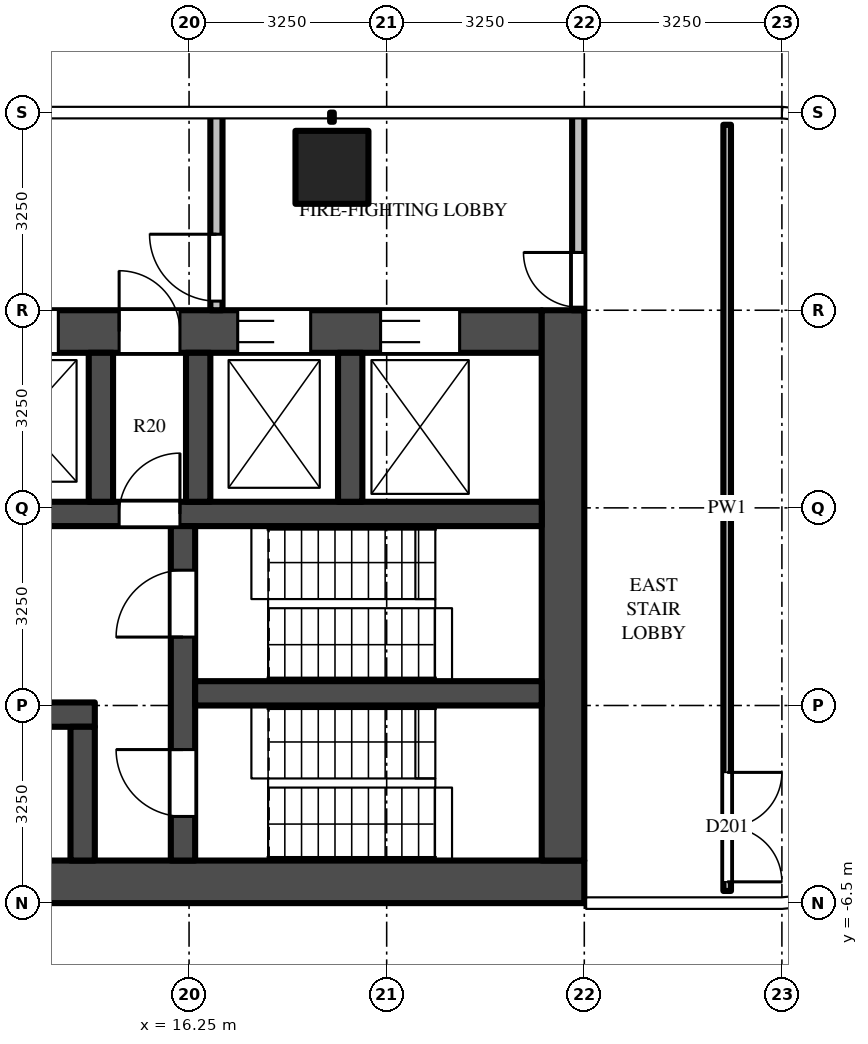
"""IFC4 building model, lengths in metres.
Left out: names, types, materials, properties, quantities, classifications, styles, units other than length and angle.
Written with IfcOpenShell. Run it as: python <this file> out.ifc"""

import sys

from ifc_helpers import new_model, si_unit, direction, frame, frame_2d, origin, origin_2d, place, context, subcontext, project, spatial, rectangle, extrude, source, transform, mapped, element, fill, save


model = new_model("IFC4")
c1 = context("Model", 3, precision=1e-05, world=origin(), true_north=direction((0.0, 1.0)))
c2 = subcontext(c1, "Body", "Model", "MODEL_VIEW")
j1 = project(units=[si_unit("LENGTHUNIT", "METRE"), si_unit("PLANEANGLEUNIT", "RADIAN")], contexts=[c1])
p1 = place(None, origin())
s1 = spatial("IfcSite", under=j1, at=p1, CompositionType="ELEMENT")
p2 = place(p1, origin())
s2 = spatial("IfcBuilding", under=s1, at=p2, CompositionType="ELEMENT")
p3 = place(p2, frame((0.0, 0.0, 208.8)))
s3 = spatial("IfcBuildingStorey", under=s2, at=p3, CompositionType="ELEMENT", Elevation=208.8)
m1 = source(origin(), c2, "Body", "SweptSolid", [
    extrude(rectangle(XDim=1.2, YDim=1.2, at=origin_2d()), origin(), (0.0, 0.0, 1.0), 3.9),
])
p4 = place(p3, frame((18.6, 5.6, 0.0), z_axis=(0.0, 0.0, 1.0), x_axis=(1.0, 0.0, 0.0)))
e1 = element("IfcColumn", 1, at=p4, inside=s3, PredefinedType="COLUMN", context=c2, shape_type="MappedRepresentation", body=[
    mapped(m1, transform((0.0, 0.0, 0.0))),
])
m2 = source(origin(), c2, "Body", "SweptSolid", [
    extrude(rectangle(XDim=16.55, YDim=0.7, at=frame_2d((8.275, 0.0))), origin(), (0.0, 0.0, 1.0), 3.45),
])
p5 = place(p3, frame((6.2, -6.15, 0.0), z_axis=(0.0, 0.0, 1.0), x_axis=(1.0, 0.0, 0.0)))
e2 = element("IfcWall", 2, at=p5, inside=s3, PredefinedType="SHEAR", context=c2, shape_type="MappedRepresentation", body=[
    mapped(m2, transform((0.0, 0.0, 0.0))),
])
m3 = source(origin(), c2, "Body", "SweptSolid", [
    extrude(rectangle(XDim=14.85, YDim=0.7, at=frame_2d((7.425, 0.0))), origin(), (0.0, 0.0, 1.0), 3.45),
])
p6 = place(p3, frame((7.2, 2.9, 0.0), z_axis=(0.0, 0.0, 1.0), x_axis=(1.0, 0.0, 0.0)))
e3 = element("IfcWall", 3, at=p6, inside=s3, PredefinedType="SHEAR", context=c2, shape_type="MappedRepresentation", body=[
    mapped(m3, transform((0.0, 0.0, 0.0))),
])
m4 = source(origin(), c2, "Body", "SweptSolid", [
    extrude(rectangle(XDim=1.1, YDim=2.1, at=frame_2d((0.55, 1.05))), frame((0.0, 0.36, 0.0), z_axis=(0.0, -1.0, 0.0), x_axis=(1.0, 0.0, 0.0)), (0.0, 0.0, 1.0), 0.72),
])
p7 = place(p6, frame((0.55, 0.0, 0.0)))
e4 = element("IfcOpeningElement", 4, at=p7, cuts=e3, PredefinedType="OPENING", context=c2, shape_type="MappedRepresentation", body=[
    mapped(m4, transform((0.0, 0.0, 0.0))),
])
p8 = place(p6, frame((3.15, 0.0, 0.0)))
e5 = element("IfcOpeningElement", 5, at=p8, cuts=e3, PredefinedType="OPENING", context=c2, shape_type="MappedRepresentation", body=[
    mapped(m4, transform((0.0, 0.0, 0.0))),
])
m5 = source(origin(), c2, "Body", "SweptSolid", [
    extrude(rectangle(XDim=1.2, YDim=2.1, at=frame_2d((0.6, 1.05))), frame((0.0, 0.36, 0.0), z_axis=(0.0, -1.0, 0.0), x_axis=(1.0, 0.0, 0.0)), (0.0, 0.0, 1.0), 0.72),
])
p9 = place(p6, frame((5.7, 0.0, 0.0)))
e6 = element("IfcOpeningElement", 6, at=p9, cuts=e3, PredefinedType="OPENING", context=c2, shape_type="MappedRepresentation", body=[
    mapped(m5, transform((0.0, 0.0, 0.0))),
])
m6 = source(origin(), c2, "Body", "SweptSolid", [
    extrude(rectangle(XDim=1.3, YDim=2.1, at=frame_2d((0.65, 1.05))), frame((0.0, 0.36, 0.0), z_axis=(0.0, -1.0, 0.0), x_axis=(1.0, 0.0, 0.0)), (0.0, 0.0, 1.0), 0.72),
])
p10 = place(p6, frame((12.2, 0.0, 0.0)))
e7 = element("IfcOpeningElement", 7, at=p10, cuts=e3, PredefinedType="OPENING", context=c2, shape_type="MappedRepresentation", body=[
    mapped(m6, transform((0.0, 0.0, 0.0))),
])
p11 = place(p6, frame((9.85, 0.0, 0.0)))
e8 = element("IfcOpeningElement", 8, at=p11, cuts=e3, PredefinedType="OPENING", context=c2, shape_type="MappedRepresentation", body=[
    mapped(m5, transform((0.0, 0.0, 0.0))),
])
m7 = source(origin(), c2, "Body", "SweptSolid", [
    extrude(rectangle(XDim=1.0, YDim=2.1, at=frame_2d((0.5, 1.05))), frame((0.0, 0.36, 0.0), z_axis=(0.0, -1.0, 0.0), x_axis=(1.0, 0.0, 0.0)), (0.0, 0.0, 1.0), 0.72),
])
p12 = place(p6, frame((7.9, 0.0, 0.0)))
e9 = element("IfcOpeningElement", 9, at=p12, cuts=e3, PredefinedType="OPENING", context=c2, shape_type="MappedRepresentation", body=[
    mapped(m7, transform((0.0, 0.0, 0.0))),
])
m8 = source(origin(), c2, "Body", "SweptSolid", [
    extrude(rectangle(XDim=9.05, YDim=0.7, at=frame_2d((4.525, 0.0))), origin(), (0.0, 0.0, 1.0), 3.45),
])
p13 = place(p3, frame((22.4, -5.8, 0.0), z_axis=(0.0, 0.0, 1.0), x_axis=(0.0, 1.0, 0.0)))
e10 = element("IfcWall", 10, at=p13, inside=s3, PredefinedType="SHEAR", context=c2, shape_type="MappedRepresentation", body=[
    mapped(m8, transform((0.0, 0.0, 0.0))),
])
m9 = source(origin(), c2, "Body", "SweptSolid", [
    extrude(rectangle(XDim=7.5, YDim=0.4, at=frame_2d((3.75, 0.0))), origin(), (0.0, 0.0, 1.0), 3.45),
])
p14 = place(p3, frame((7.2, -3.4, 0.0), z_axis=(0.0, 0.0, 1.0), x_axis=(1.0, 0.0, 0.0)))
e11 = element("IfcWall", 11, at=p14, inside=s3, PredefinedType="SHEAR", context=c2, shape_type="MappedRepresentation", body=[
    mapped(m9, transform((0.0, 0.0, 0.0))),
])
m10 = source(origin(), c2, "Body", "SweptSolid", [
    extrude(rectangle(XDim=1.0, YDim=2.1, at=frame_2d((0.5, 1.05))), frame((0.0, 0.21, 0.0), z_axis=(0.0, -1.0, 0.0), x_axis=(1.0, 0.0, 0.0)), (0.0, 0.0, 1.0), 0.42),
])
p15 = place(p14, frame((1.238, 0.0, 0.0)))
e12 = element("IfcOpeningElement", 12, at=p15, cuts=e11, PredefinedType="OPENING", context=c2, shape_type="MappedRepresentation", body=[
    mapped(m10, transform((0.0, 0.0, 0.0))),
])
m11 = source(origin(), c2, "Body", "SweptSolid", [
    extrude(rectangle(XDim=0.9, YDim=2.1, at=frame_2d((0.45, 1.05))), frame((0.0, 0.21, 0.0), z_axis=(0.0, -1.0, 0.0), x_axis=(1.0, 0.0, 0.0)), (0.0, 0.0, 1.0), 0.42),
])
p16 = place(p14, frame((4.913, 0.0, 0.0)))
e13 = element("IfcOpeningElement", 13, at=p16, cuts=e11, PredefinedType="OPENING", context=c2, shape_type="MappedRepresentation", body=[
    mapped(m11, transform((0.0, 0.0, 0.0))),
])
m12 = source(origin(), c2, "Body", "SweptSolid", [
    extrude(rectangle(XDim=14.85, YDim=0.4, at=frame_2d((7.425, 0.0))), origin(), (0.0, 0.0, 1.0), 3.45),
])
p17 = place(p3, frame((7.2, -0.1, 0.0), z_axis=(0.0, 0.0, 1.0), x_axis=(1.0, 0.0, 0.0)))
e14 = element("IfcWall", 14, at=p17, inside=s3, PredefinedType="SHEAR", context=c2, shape_type="MappedRepresentation", body=[
    mapped(m12, transform((0.0, 0.0, 0.0))),
])
p18 = place(p17, frame((7.9, 0.0, 0.0)))
e15 = element("IfcOpeningElement", 15, at=p18, cuts=e14, PredefinedType="OPENING", context=c2, shape_type="MappedRepresentation", body=[
    mapped(m10, transform((0.0, 0.0, 0.0))),
])
m13 = source(origin(), c2, "Body", "SweptSolid", [
    extrude(rectangle(XDim=5.5, YDim=0.4, at=frame_2d((2.75, 0.0))), origin(), (0.0, 0.0, 1.0), 3.45),
])
p19 = place(p3, frame((16.15, -5.8, 0.0), z_axis=(0.0, 0.0, 1.0), x_axis=(0.0, 1.0, 0.0)))
e16 = element("IfcWall", 16, at=p19, inside=s3, PredefinedType="SHEAR", context=c2, shape_type="MappedRepresentation", body=[
    mapped(m13, transform((0.0, 0.0, 0.0))),
])
m14 = source(origin(), c2, "Body", "SweptSolid", [
    extrude(rectangle(XDim=1.1, YDim=2.1, at=frame_2d((0.55, 1.05))), frame((0.0, 0.21, 0.0), z_axis=(0.0, -1.0, 0.0), x_axis=(1.0, 0.0, 0.0)), (0.0, 0.0, 1.0), 0.42),
])
p20 = place(p19, frame((0.725, 0.0, 0.0)))
e17 = element("IfcOpeningElement", 17, at=p20, cuts=e16, PredefinedType="OPENING", context=c2, shape_type="MappedRepresentation", body=[
    mapped(m14, transform((0.0, 0.0, 0.0))),
])
p21 = place(p19, frame((3.675, 0.0, 0.0)))
e18 = element("IfcOpeningElement", 18, at=p21, cuts=e16, PredefinedType="OPENING", context=c2, shape_type="MappedRepresentation", body=[
    mapped(m14, transform((0.0, 0.0, 0.0))),
])
m15 = source(origin(), c2, "Body", "SweptSolid", [
    extrude(rectangle(XDim=5.7, YDim=0.4, at=frame_2d((2.85, 0.0))), origin(), (0.0, 0.0, 1.0), 3.45),
])
p22 = place(p3, frame((16.35, -3.05, 0.0), z_axis=(0.0, 0.0, 1.0), x_axis=(1.0, 0.0, 0.0)))
e19 = element("IfcWall", 19, at=p22, inside=s3, PredefinedType="SHEAR", context=c2, shape_type="MappedRepresentation", body=[
    mapped(m15, transform((0.0, 0.0, 0.0))),
])
m16 = source(origin(), c2, "Body", "SweptSolid", [
    extrude(rectangle(XDim=2.2, YDim=0.4, at=frame_2d((1.1, 0.0))), origin(), (0.0, 0.0, 1.0), 3.45),
])
p23 = place(p3, frame((14.5, -5.8, 0.0), z_axis=(0.0, 0.0, 1.0), x_axis=(0.0, 1.0, 0.0)))
e20 = element("IfcWall", 20, at=p23, inside=s3, PredefinedType="SHEAR", context=c2, shape_type="MappedRepresentation", body=[
    mapped(m16, transform((0.0, 0.0, 0.0))),
])
m17 = source(origin(), c2, "Body", "SweptSolid", [
    extrude(rectangle(XDim=2.45, YDim=0.4, at=frame_2d((1.225, 0.0))), origin(), (0.0, 0.0, 1.0), 3.45),
])
for number, where, z_axis, x_axis in (
    (21, (14.8, 0.1, 0.0), (0.0, 0.0, 1.0), (0.0, 1.0, 0.0)),
    (22, (16.4, 0.1, 0.0), (0.0, 0.0, 1.0), (0.0, 1.0, 0.0)),
    (23, (18.9, 0.1, 0.0), (0.0, 0.0, 1.0), (0.0, 1.0, 0.0)),
):
    element("IfcWall", number, at=place(p3, frame(where, z_axis=z_axis, x_axis=x_axis)), inside=s3, PredefinedType="SHEAR", context=c2, shape_type="MappedRepresentation", body=[
        mapped(m17, transform((0.0, 0.0, 0.0))),
    ])
m18 = source(origin(), c2, "Body", "SweptSolid", [
    extrude(rectangle(XDim=3.25, YDim=0.2, at=frame_2d((1.625, 0.0))), origin(), (0.0, 0.0, 1.0), 3.45),
])
p24 = place(p3, frame((16.7, 3.25, 0.0), z_axis=(0.0, 0.0, 1.0), x_axis=(0.0, 1.0, 0.0)))
e24 = element("IfcWall", 24, at=p24, inside=s3, PredefinedType="PARTITIONING", context=c2, shape_type="MappedRepresentation", body=[
    mapped(m18, transform((0.0, 0.0, 0.0))),
])
m19 = source(origin(), c2, "Body", "SweptSolid", [
    extrude(rectangle(XDim=1.1, YDim=2.1, at=frame_2d((0.55, 1.05))), frame((0.0, 0.11, 0.0), z_axis=(0.0, -1.0, 0.0), x_axis=(1.0, 0.0, 0.0)), (0.0, 0.0, 1.0), 0.22),
])
p25 = place(p24, frame((0.15, 0.0, 0.0)))
e25 = element("IfcOpeningElement", 25, at=p25, cuts=e24, PredefinedType="OPENING", context=c2, shape_type="MappedRepresentation", body=[
    mapped(m19, transform((0.0, 0.0, 0.0))),
])
p26 = place(p3, frame((22.65, 3.25, 0.0), z_axis=(0.0, 0.0, 1.0), x_axis=(0.0, 1.0, 0.0)))
e26 = element("IfcWall", 26, at=p26, inside=s3, PredefinedType="PARTITIONING", context=c2, shape_type="MappedRepresentation", body=[
    mapped(m18, transform((0.0, 0.0, 0.0))),
])
m20 = source(origin(), c2, "Body", "SweptSolid", [
    extrude(rectangle(XDim=0.9, YDim=2.1, at=frame_2d((0.45, 1.05))), frame((0.0, 0.11, 0.0), z_axis=(0.0, -1.0, 0.0), x_axis=(1.0, 0.0, 0.0)), (0.0, 0.0, 1.0), 0.22),
])
p27 = place(p26, frame((0.05, 0.0, 0.0)))
e27 = element("IfcOpeningElement", 27, at=p27, cuts=e26, PredefinedType="OPENING", context=c2, shape_type="MappedRepresentation", body=[
    mapped(m20, transform((0.0, 0.0, 0.0))),
])
m21 = source(origin(), c2, "Body", "SweptSolid", [
    extrude(rectangle(XDim=12.6, YDim=0.125, at=frame_2d((6.3, 0.0))), origin(), (0.0, 0.0, 1.0), 2.53),
])
p28 = place(p3, frame((25.1, 6.3, 0.0), z_axis=(0.0, 0.0, 1.0), x_axis=(0.0, -1.0, 0.0)))
e28 = element("IfcWall", 28, at=p28, inside=s3, PredefinedType="PARTITIONING", context=c2, shape_type="MappedRepresentation", body=[
    mapped(m21, transform((0.0, 0.0, 0.0))),
])
m22 = source(origin(), c2, "Body", "SweptSolid", [
    extrude(rectangle(XDim=1.8, YDim=2.1, at=frame_2d((0.9, 1.05))), frame((0.0, 0.073, 0.0), z_axis=(0.0, -1.0, 0.0), x_axis=(1.0, 0.0, 0.0)), (0.0, 0.0, 1.0), 0.145),
])
p29 = place(p28, frame((10.65, 0.0, 0.0)))
e29 = element("IfcOpeningElement", 29, at=p29, cuts=e28, PredefinedType="OPENING", context=c2, shape_type="MappedRepresentation", body=[
    mapped(m22, transform((0.0, 0.0, 0.0))),
])
m23 = source(origin(), c2, "Body", "SweptSolid", [
    extrude(rectangle(XDim=1.2, YDim=2.1, at=frame_2d((0.6, 1.05))), frame((0.0, -0.275, 0.0), z_axis=(0.0, -1.0, 0.0), x_axis=(1.0, 0.0, 0.0)), (0.0, 0.0, 1.0), 0.05),
])
p30 = place(p9, origin())
e30 = element("IfcDoor", 30, at=p30, inside=s3, OperationType="DOUBLE_DOOR_SLIDING", PredefinedType="DOOR", context=c2, shape_type="MappedRepresentation", body=[
    mapped(m23, transform((0.0, 0.0, 0.0))),
])
fill(e6, e30)
m24 = source(origin(), c2, "Body", "SweptSolid", [
    extrude(rectangle(XDim=1.3, YDim=2.1, at=frame_2d((0.65, 1.05))), frame((0.0, -0.275, 0.0), z_axis=(0.0, -1.0, 0.0), x_axis=(1.0, 0.0, 0.0)), (0.0, 0.0, 1.0), 0.05),
])
p31 = place(p10, origin())
e31 = element("IfcDoor", 31, at=p31, inside=s3, OperationType="DOUBLE_DOOR_SLIDING", PredefinedType="DOOR", context=c2, shape_type="MappedRepresentation", body=[
    mapped(m24, transform((0.0, 0.0, 0.0))),
])
fill(e7, e31)
p32 = place(p11, origin())
e32 = element("IfcDoor", 32, at=p32, inside=s3, OperationType="DOUBLE_DOOR_SLIDING", PredefinedType="DOOR", context=c2, shape_type="MappedRepresentation", body=[
    mapped(m23, transform((0.0, 0.0, 0.0))),
])
fill(e8, e32)
m25 = source(origin(), c2, "Body", "SweptSolid", [
    extrude(rectangle(XDim=1.1, YDim=2.1, at=frame_2d((0.55, 1.05))), frame((0.0, 0.025, 0.0), z_axis=(0.0, -1.0, 0.0), x_axis=(1.0, 0.0, 0.0)), (0.0, 0.0, 1.0), 0.05),
])
p33 = place(p20, origin())
e33 = element("IfcDoor", 33, at=p33, inside=s3, OperationType="SINGLE_SWING_RIGHT", PredefinedType="DOOR", context=c2, shape_type="MappedRepresentation", body=[
    mapped(m25, transform((0.0, 0.0, 0.0))),
])
fill(e17, e33)
p34 = place(p21, origin())
e34 = element("IfcDoor", 34, at=p34, inside=s3, OperationType="SINGLE_SWING_LEFT", PredefinedType="DOOR", context=c2, shape_type="MappedRepresentation", body=[
    mapped(m25, transform((0.0, 0.0, 0.0))),
])
fill(e18, e34)
m26 = source(origin(), c2, "Body", "SweptSolid", [
    extrude(rectangle(XDim=1.0, YDim=2.1, at=frame_2d((0.5, 1.05))), frame((0.0, 0.025, 0.0), z_axis=(0.0, -1.0, 0.0), x_axis=(1.0, 0.0, 0.0)), (0.0, 0.0, 1.0), 0.05),
])
p35 = place(p18, origin())
e35 = element("IfcDoor", 35, at=p35, inside=s3, OperationType="SINGLE_SWING_RIGHT", PredefinedType="DOOR", context=c2, shape_type="MappedRepresentation", body=[
    mapped(m26, transform((0.0, 0.0, 0.0))),
])
fill(e15, e35)
m27 = source(origin(), c2, "Body", "SweptSolid", [
    extrude(rectangle(XDim=1.0, YDim=2.1, at=frame_2d((0.5, 1.05))), frame((0.0, -0.275, 0.0), z_axis=(0.0, -1.0, 0.0), x_axis=(1.0, 0.0, 0.0)), (0.0, 0.0, 1.0), 0.05),
])
p36 = place(p12, origin())
e36 = element("IfcDoor", 36, at=p36, inside=s3, OperationType="SINGLE_SWING_LEFT", PredefinedType="DOOR", context=c2, shape_type="MappedRepresentation", body=[
    mapped(m27, transform((0.0, 0.0, 0.0))),
])
fill(e9, e36)
p37 = place(p25, origin())
e37 = element("IfcDoor", 37, at=p37, inside=s3, OperationType="SINGLE_SWING_RIGHT", PredefinedType="DOOR", context=c2, shape_type="MappedRepresentation", body=[
    mapped(m25, transform((0.0, 0.0, 0.0))),
])
fill(e25, e37)
m28 = source(origin(), c2, "Body", "SweptSolid", [
    extrude(rectangle(XDim=0.9, YDim=2.1, at=frame_2d((0.45, 1.05))), frame((0.0, 0.025, 0.0), z_axis=(0.0, -1.0, 0.0), x_axis=(1.0, 0.0, 0.0)), (0.0, 0.0, 1.0), 0.05),
])
p38 = place(p27, origin())
e38 = element("IfcDoor", 38, at=p38, inside=s3, OperationType="SINGLE_SWING_RIGHT", PredefinedType="DOOR", context=c2, shape_type="MappedRepresentation", body=[
    mapped(m28, transform((0.0, 0.0, 0.0))),
])
fill(e27, e38)
m29 = source(origin(), c2, "Body", "SweptSolid", [
    extrude(rectangle(XDim=1.8, YDim=2.1, at=frame_2d((0.9, 1.05))), frame((0.0, 0.025, 0.0), z_axis=(0.0, -1.0, 0.0), x_axis=(1.0, 0.0, 0.0)), (0.0, 0.0, 1.0), 0.05),
])
p39 = place(p29, origin())
e39 = element("IfcDoor", 39, at=p39, inside=s3, OperationType="DOUBLE_DOOR_SINGLE_SWING", PredefinedType="DOOR", context=c2, shape_type="MappedRepresentation", body=[
    mapped(m29, transform((0.0, 0.0, 0.0))),
])
fill(e29, e39)
save(model, sys.argv[1])
